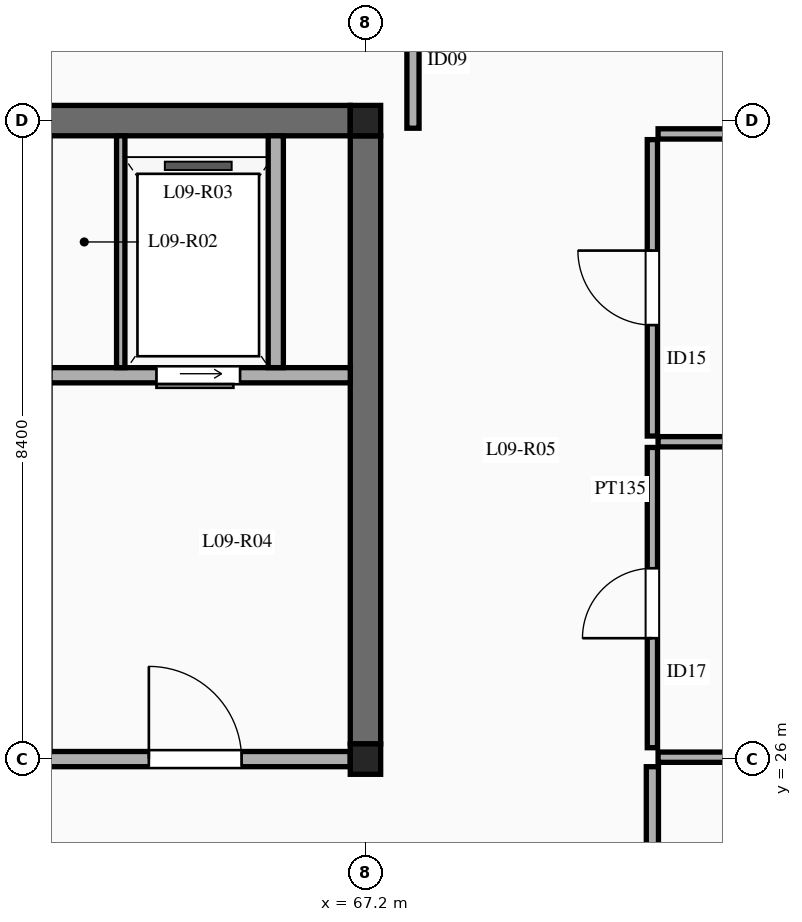
"""IFC4 building model, lengths in metres.
Left out: names, types, materials, properties, quantities, classifications, styles, units other than length and angle.
Written with IfcOpenShell. Run it as: python <this file> out.ifc"""

import sys

from ifc_helpers import new_model, si_unit, direction, frame, frame_2d, origin, origin_2d, place, context, subcontext, project, spatial, rectangle, extrude, element, fill, save


model = new_model("IFC4")
c1 = context("Model", 3, precision=1e-05, world=origin(), true_north=direction((0.0, 1.0)))
c2 = subcontext(c1, "Body", "Model", "MODEL_VIEW")
j1 = project(units=[si_unit("LENGTHUNIT", "METRE"), si_unit("PLANEANGLEUNIT", "RADIAN")], contexts=[c1])
p1 = place(None, origin())
s1 = spatial("IfcSite", under=j1, at=p1, CompositionType="ELEMENT")
p2 = place(p1, origin())
s2 = spatial("IfcBuilding", under=s1, at=p2, CompositionType="ELEMENT")
p3 = place(p2, frame((0.0, 0.0, 42.0)))
s3 = spatial("IfcBuildingStorey", under=s2, at=p3, CompositionType="ELEMENT", Elevation=42.0)
for number, where, z_axis, x_axis in (
    (1, (67.2, 26.0, 0.0), (0.0, 0.0, 1.0), (1.0, 0.0, 0.0)),
    (2, (67.2, 34.4, 0.0), (0.0, 0.0, 1.0), (1.0, 0.0, 0.0)),
):
    element("IfcColumn", number, at=place(p3, frame(where, z_axis=z_axis, x_axis=x_axis)), inside=s3, PredefinedType="COLUMN", context=c2, shape_type="SweptSolid", body=[
        extrude(rectangle(XDim=0.4, YDim=0.4, at=origin_2d()), origin(), (0.0, 0.0, 1.0), 4.5),
    ])
for number, where, z_axis, x_axis in (
    (3, (67.2, 26.2, 0.0), (0.0, 0.0, 1.0), (0.0, 1.0, 0.0)),
    (4, (59.0, 34.4, 0.0), (0.0, 0.0, 1.0), (1.0, 0.0, 0.0)),
):
    element("IfcWall", number, at=place(p3, frame(where, z_axis=z_axis, x_axis=x_axis)), inside=s3, PredefinedType="SHEAR", context=c2, shape_type="SweptSolid", body=[
        extrude(rectangle(XDim=8.0, YDim=0.4, at=frame_2d((4.0, 0.0))), origin(), (0.0, 0.0, 1.0), 4.5),
    ])
p4 = place(p3, frame((59.0, 26.0, 0.0), z_axis=(0.0, 0.0, 1.0), x_axis=(1.0, 0.0, 0.0)))
e5 = element("IfcWall", 5, at=p4, inside=s3, PredefinedType="SOLIDWALL", context=c2, shape_type="SweptSolid", body=[
    extrude(rectangle(XDim=8.0, YDim=0.2, at=frame_2d((4.0, 0.0))), origin(), (0.0, 0.0, 1.0), 3.78),
])
p5 = place(p4, frame((1.55, 0.0, 0.0)))
e6 = element("IfcOpeningElement", 6, at=p5, cuts=e5, PredefinedType="OPENING", context=c2, shape_type="SweptSolid", body=[
    extrude(rectangle(XDim=1.15, YDim=2.15, at=frame_2d((0.575, 1.075))), frame((0.0, 0.11, 0.0), z_axis=(0.0, -1.0, 0.0), x_axis=(1.0, 0.0, 0.0)), (0.0, 0.0, 1.0), 0.22),
])
p6 = place(p4, frame((5.35, 0.0, 0.0)))
e7 = element("IfcOpeningElement", 7, at=p6, cuts=e5, PredefinedType="OPENING", context=c2, shape_type="SweptSolid", body=[
    extrude(rectangle(XDim=1.22, YDim=2.15, at=frame_2d((0.61, 1.075))), frame((0.0, 0.11, 0.0), z_axis=(0.0, -1.0, 0.0), x_axis=(1.0, 0.0, 0.0)), (0.0, 0.0, 1.0), 0.22),
])
p7 = place(p3, frame((63.05, 31.05, 0.0), z_axis=(0.0, 0.0, 1.0), x_axis=(1.0, 0.0, 0.0)))
e8 = element("IfcWall", 8, at=p7, inside=s3, PredefinedType="SOLIDWALL", context=c2, shape_type="SweptSolid", body=[
    extrude(rectangle(XDim=3.95, YDim=0.2, at=frame_2d((1.975, 0.0))), origin(), (0.0, 0.0, 1.0), 4.3),
])
p8 = place(p7, frame((1.4, 0.0, 0.0)))
e9 = element("IfcOpeningElement", 9, at=p8, cuts=e8, PredefinedType="OPENING", context=c2, shape_type="SweptSolid", body=[
    extrude(rectangle(XDim=1.1, YDim=2.15, at=frame_2d((0.55, 1.075))), frame((0.0, 0.11, 0.0), z_axis=(0.0, -1.0, 0.0), x_axis=(1.0, 0.0, 0.0)), (0.0, 0.0, 1.0), 0.22),
])
p9 = place(p3, frame((63.98, 31.15, 0.0), z_axis=(0.0, 0.0, 1.0), x_axis=(0.0, 1.0, 0.0)))
e10 = element("IfcWall", 10, at=p9, inside=s3, PredefinedType="PARTITIONING", context=c2, shape_type="SweptSolid", body=[
    extrude(rectangle(XDim=3.05, YDim=0.11, at=frame_2d((1.525, 0.0))), origin(), (0.0, 0.0, 1.0), 4.3),
])
p10 = place(p3, frame((66.02, 31.15, 0.0), z_axis=(0.0, 0.0, 1.0), x_axis=(0.0, 1.0, 0.0)))
e11 = element("IfcWall", 11, at=p10, inside=s3, PredefinedType="SOLIDWALL", context=c2, shape_type="SweptSolid", body=[
    extrude(rectangle(XDim=3.05, YDim=0.2, at=frame_2d((1.525, 0.0))), origin(), (0.0, 0.0, 1.0), 4.3),
])
p11 = place(p3, frame((70.975, 26.15, 0.0), z_axis=(0.0, 0.0, 1.0), x_axis=(0.0, 1.0, 0.0)))
e12 = element("IfcWall", 12, at=p11, inside=s3, PredefinedType="PARTITIONING", context=c2, shape_type="SweptSolid", body=[
    extrude(rectangle(XDim=3.95, YDim=0.135, at=frame_2d((1.975, 0.0))), origin(), (0.0, 0.0, 1.0), 3.45),
])
p12 = place(p11, frame((1.441, 0.0, 0.0)))
e13 = element("IfcOpeningElement", 13, at=p12, cuts=e12, PredefinedType="OPENING", context=c2, shape_type="SweptSolid", body=[
    extrude(rectangle(XDim=0.92, YDim=2.12, at=frame_2d((0.46, 1.06))), frame((0.0, 0.077, 0.0), z_axis=(0.0, -1.0, 0.0), x_axis=(1.0, 0.0, 0.0)), (0.0, 0.0, 1.0), 0.155),
])
p13 = place(p3, frame((70.975, 30.25, 0.0), z_axis=(0.0, 0.0, 1.0), x_axis=(0.0, 1.0, 0.0)))
e14 = element("IfcWall", 14, at=p13, inside=s3, PredefinedType="PARTITIONING", context=c2, shape_type="SweptSolid", body=[
    extrude(rectangle(XDim=3.9, YDim=0.135, at=frame_2d((1.95, 0.0))), origin(), (0.0, 0.0, 1.0), 3.45),
])
p14 = place(p13, frame((1.46, 0.0, 0.0)))
e15 = element("IfcOpeningElement", 15, at=p14, cuts=e14, PredefinedType="OPENING", context=c2, shape_type="SweptSolid", body=[
    extrude(rectangle(XDim=0.98, YDim=2.15, at=frame_2d((0.49, 1.075))), frame((0.0, 0.077, 0.0), z_axis=(0.0, -1.0, 0.0), x_axis=(1.0, 0.0, 0.0)), (0.0, 0.0, 1.0), 0.155),
])
for number, where, z_axis, x_axis in (
    (16, (71.05, 30.175, 0.0), (0.0, 0.0, 1.0), (1.0, 0.0, 0.0)),
    (17, (71.05, 26.025, 0.0), (0.0, 0.0, 1.0), (1.0, 0.0, 0.0)),
    (18, (71.05, 34.225, 0.0), (0.0, 0.0, 1.0), (1.0, 0.0, 0.0)),
):
    element("IfcWall", number, at=place(p3, frame(where, z_axis=z_axis, x_axis=x_axis)), inside=s3, PredefinedType="PARTITIONING", context=c2, shape_type="SweptSolid", body=[
        extrude(rectangle(XDim=3.85, YDim=0.135, at=frame_2d((1.925, 0.0))), origin(), (0.0, 0.0, 1.0), 3.45),
    ])
p15 = place(p3, frame((70.975, 21.315, 0.0), z_axis=(0.0, 0.0, 1.0), x_axis=(0.0, 1.0, 0.0)))
e19 = element("IfcWall", 19, at=p15, inside=s3, PredefinedType="PARTITIONING", context=c2, shape_type="SweptSolid", body=[
    extrude(rectangle(XDim=4.585, YDim=0.16, at=frame_2d((2.292, 0.0))), origin(), (0.0, 0.0, 1.0), 3.45),
])
p16 = place(p3, frame((67.825, 34.3, 0.0), z_axis=(0.0, 0.0, 1.0), x_axis=(0.0, 1.0, 0.0)))
e20 = element("IfcWall", 20, at=p16, inside=s3, PredefinedType="PARTITIONING", context=c2, shape_type="SweptSolid", body=[
    extrude(rectangle(XDim=2.75, YDim=0.16, at=frame_2d((1.375, 0.0))), origin(), (0.0, 0.0, 1.0), 3.45),
])
p17 = place(p16, frame((1.34, 0.0, 0.0)))
e21 = element("IfcOpeningElement", 21, at=p17, cuts=e20, PredefinedType="OPENING", context=c2, shape_type="SweptSolid", body=[
    extrude(rectangle(XDim=1.16, YDim=2.2, at=frame_2d((0.58, 1.1))), frame((0.0, 0.09, 0.0), z_axis=(0.0, -1.0, 0.0), x_axis=(1.0, 0.0, 0.0)), (0.0, 0.0, 1.0), 0.18),
])
p18 = place(p6, origin())
e22 = element("IfcDoor", 22, at=p18, inside=s3, OperationType="SINGLE_SWING_LEFT", PredefinedType="DOOR", context=c2, shape_type="SweptSolid", body=[
    extrude(rectangle(XDim=1.22, YDim=2.15, at=frame_2d((0.61, 1.075))), frame((0.0, 0.025, 0.0), z_axis=(0.0, -1.0, 0.0), x_axis=(1.0, 0.0, 0.0)), (0.0, 0.0, 1.0), 0.05),
])
fill(e7, e22)
p19 = place(p8, frame((1.1, 0.0, 0.0), z_axis=(0.0, 0.0, 1.0), x_axis=(-1.0, 0.0, 0.0)))
e23 = element("IfcDoor", 23, at=p19, inside=s3, OperationType="SLIDING_TO_LEFT", PredefinedType="DOOR", context=c2, shape_type="SweptSolid", body=[
    extrude(rectangle(XDim=1.1, YDim=2.15, at=frame_2d((0.55, 1.075))), frame((0.0, 0.025, 0.0), z_axis=(0.0, -1.0, 0.0), x_axis=(1.0, 0.0, 0.0)), (0.0, 0.0, 1.0), 0.05),
])
fill(e9, e23)
p20 = place(p12, origin())
e24 = element("IfcDoor", 24, at=p20, inside=s3, OperationType="SINGLE_SWING_LEFT", PredefinedType="DOOR", context=c2, shape_type="SweptSolid", body=[
    extrude(rectangle(XDim=0.92, YDim=2.12, at=frame_2d((0.46, 1.06))), frame((0.0, 0.025, 0.0), z_axis=(0.0, -1.0, 0.0), x_axis=(1.0, 0.0, 0.0)), (0.0, 0.0, 1.0), 0.05),
])
fill(e13, e24)
p21 = place(p14, origin())
e25 = element("IfcDoor", 25, at=p21, inside=s3, OperationType="SINGLE_SWING_RIGHT", PredefinedType="DOOR", context=c2, shape_type="SweptSolid", body=[
    extrude(rectangle(XDim=0.98, YDim=2.15, at=frame_2d((0.49, 1.075))), frame((0.0, 0.025, 0.0), z_axis=(0.0, -1.0, 0.0), x_axis=(1.0, 0.0, 0.0)), (0.0, 0.0, 1.0), 0.05),
])
fill(e15, e25)
save(model, sys.argv[1])
